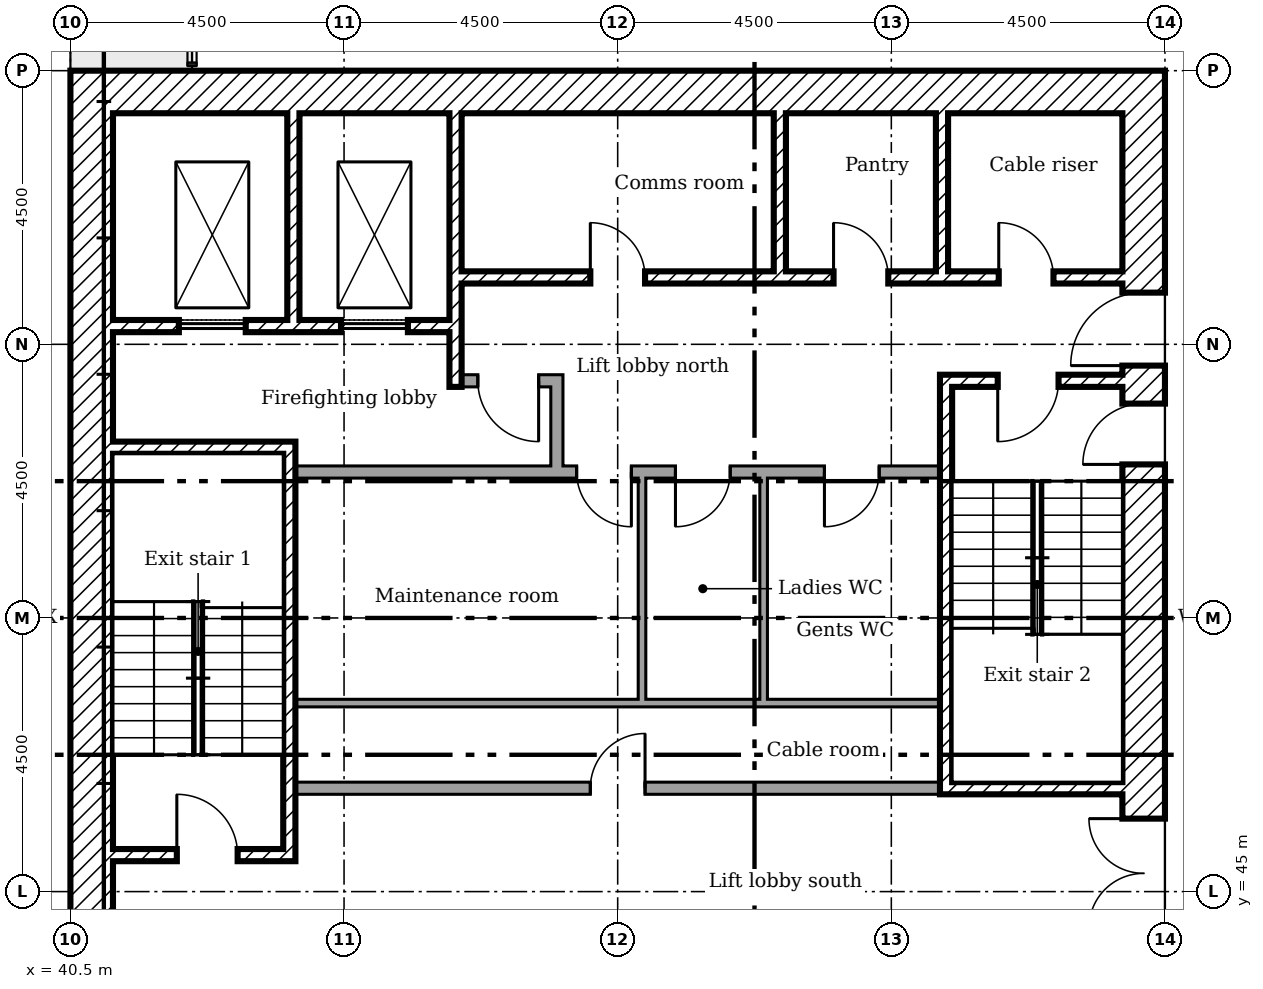
"""IFC4 building model, lengths in metres.
Left out: names, types, materials, properties, quantities, classifications, styles, units other than length and angle.
Written with IfcOpenShell. Run it as: python <this file> out.ifc"""

import sys

from ifc_helpers import new_model, si_unit, direction, frame, frame_2d, origin, place, context, subcontext, project, spatial, rectangle, extrude, element, fill, save


model = new_model("IFC4")
c1 = context("Model", 3, precision=1e-05, world=origin(), true_north=direction((0.0, 1.0)))
c2 = subcontext(c1, "Body", "Model", "MODEL_VIEW")
j1 = project(units=[si_unit("LENGTHUNIT", "METRE"), si_unit("PLANEANGLEUNIT", "RADIAN")], contexts=[c1])
p1 = place(None, origin())
s1 = spatial("IfcSite", under=j1, at=p1, CompositionType="ELEMENT")
p2 = place(p1, origin())
s2 = spatial("IfcBuilding", under=s1, at=p2, CompositionType="ELEMENT")
p3 = place(p2, frame((0.0, 0.0, 106.4)))
s3 = spatial("IfcBuildingStorey", under=s2, at=p3, CompositionType="ELEMENT", Elevation=106.4)
p4 = place(p3, frame((58.15, 40.5, 0.0), z_axis=(0.0, 0.0, 1.0), x_axis=(0.0, 1.0, 0.0)))
e1 = element("IfcWall", 1, at=p4, inside=s3, PredefinedType="SHEAR", context=c2, shape_type="SweptSolid", body=[
    extrude(rectangle(XDim=18.0, YDim=0.7, at=frame_2d((9.0, 0.0))), origin(), (0.0, 0.0, 1.0), 3.35),
])
p5 = place(p4, frame((13.15, 0.0, 0.0)))
e2 = element("IfcOpeningElement", 2, at=p5, cuts=e1, PredefinedType="OPENING", context=c2, shape_type="SweptSolid", body=[
    extrude(rectangle(XDim=1.2, YDim=2.1, at=frame_2d((0.6, 1.05))), frame((0.0, 0.36, 0.0), z_axis=(0.0, -1.0, 0.0), x_axis=(1.0, 0.0, 0.0)), (0.0, 0.0, 1.0), 0.72),
])
p6 = place(p4, frame((3.9, 0.0, 0.0)))
e3 = element("IfcOpeningElement", 3, at=p6, cuts=e1, PredefinedType="OPENING", context=c2, shape_type="SweptSolid", body=[
    extrude(rectangle(XDim=1.8, YDim=2.1, at=frame_2d((0.9, 1.05))), frame((0.0, 0.36, 0.0), z_axis=(0.0, -1.0, 0.0), x_axis=(1.0, 0.0, 0.0)), (0.0, 0.0, 1.0), 0.72),
])
p7 = place(p4, frame((11.525, 0.0, 0.0)))
e4 = element("IfcOpeningElement", 4, at=p7, cuts=e1, PredefinedType="OPENING", context=c2, shape_type="SweptSolid", body=[
    extrude(rectangle(XDim=1.0, YDim=2.1, at=frame_2d((0.5, 1.05))), frame((0.0, 0.36, 0.0), z_axis=(0.0, -1.0, 0.0), x_axis=(1.0, 0.0, 0.0)), (0.0, 0.0, 1.0), 0.72),
])
p8 = place(p3, frame((41.2, 58.15, 0.0)))
e5 = element("IfcWall", 5, at=p8, inside=s3, PredefinedType="SHEAR", context=c2, shape_type="SweptSolid", body=[
    extrude(rectangle(XDim=16.6, YDim=0.7, at=frame_2d((8.3, 0.0))), origin(), (0.0, 0.0, 1.0), 3.35),
])
p9 = place(p3, frame((40.85, 40.5, 0.0), z_axis=(0.0, 0.0, 1.0), x_axis=(0.0, 1.0, 0.0)))
e6 = element("IfcWall", 6, at=p9, inside=s3, PredefinedType="SHEAR", context=c2, shape_type="SweptSolid", body=[
    extrude(rectangle(XDim=18.0, YDim=0.7, at=frame_2d((9.0, 0.0))), origin(), (0.0, 0.0, 1.0), 3.35),
])
p10 = place(p3, frame((44.167, 57.8, 0.0), z_axis=(0.0, 0.0, 1.0), x_axis=(0.0, -1.0, 0.0)))
e7 = element("IfcWall", 7, at=p10, inside=s3, PredefinedType="SHEAR", context=c2, shape_type="SweptSolid", body=[
    extrude(rectangle(XDim=3.4, YDim=0.2, at=frame_2d((1.7, 0.0))), origin(), (0.0, 0.0, 1.0), 3.35),
])
p11 = place(p3, frame((46.833, 57.8, 0.0), z_axis=(0.0, 0.0, 1.0), x_axis=(0.0, -1.0, 0.0)))
e8 = element("IfcWall", 8, at=p11, inside=s3, PredefinedType="SHEAR", context=c2, shape_type="SweptSolid", body=[
    extrude(rectangle(XDim=4.5, YDim=0.2, at=frame_2d((2.25, 0.0))), origin(), (0.0, 0.0, 1.0), 3.35),
])
for number, where, z_axis, x_axis in (
    (9, (52.167, 57.8, 0.0), (0.0, 0.0, 1.0), (0.0, -1.0, 0.0)),
    (10, (54.833, 57.8, 0.0), (0.0, 0.0, 1.0), (0.0, -1.0, 0.0)),
):
    element("IfcWall", number, at=place(p3, frame(where, z_axis=z_axis, x_axis=x_axis)), inside=s3, PredefinedType="SHEAR", context=c2, shape_type="SweptSolid", body=[
        extrude(rectangle(XDim=2.6, YDim=0.2, at=frame_2d((1.3, 0.0))), origin(), (0.0, 0.0, 1.0), 3.35),
    ])
p12 = place(p3, frame((48.5, 51.9, 0.0), z_axis=(0.0, 0.0, 1.0), x_axis=(0.0, 1.0, 0.0)))
e11 = element("IfcWall", 11, at=p12, inside=s3, PredefinedType="PARTITIONING", context=c2, shape_type="SweptSolid", body=[
    extrude(rectangle(XDim=1.6, YDim=0.2, at=frame_2d((0.8, 0.0))), origin(), (0.0, 0.0, 1.0), 3.35),
])
p13 = place(p3, frame((46.933, 53.4, 0.0)))
e12 = element("IfcWall", 12, at=p13, inside=s3, PredefinedType="PARTITIONING", context=c2, shape_type="SweptSolid", body=[
    extrude(rectangle(XDim=1.467, YDim=0.2, at=frame_2d((0.733, 0.0))), origin(), (0.0, 0.0, 1.0), 3.35),
])
p14 = place(p13, frame((0.267, 0.0, 0.0)))
e13 = element("IfcOpeningElement", 13, at=p14, cuts=e12, PredefinedType="OPENING", context=c2, shape_type="SweptSolid", body=[
    extrude(rectangle(XDim=1.0, YDim=2.1, at=frame_2d((0.5, 1.05))), frame((0.0, 0.11, 0.0), z_axis=(0.0, -1.0, 0.0), x_axis=(1.0, 0.0, 0.0)), (0.0, 0.0, 1.0), 0.22),
])
p15 = place(p3, frame((46.933, 55.1, 0.0)))
e14 = element("IfcWall", 14, at=p15, inside=s3, PredefinedType="SHEAR", context=c2, shape_type="SweptSolid", body=[
    extrude(rectangle(XDim=10.867, YDim=0.2, at=frame_2d((5.433, 0.0))), origin(), (0.0, 0.0, 1.0), 3.35),
])
p16 = place(p15, frame((8.833, 0.0, 0.0)))
e15 = element("IfcOpeningElement", 15, at=p16, cuts=e14, PredefinedType="OPENING", context=c2, shape_type="SweptSolid", body=[
    extrude(rectangle(XDim=0.9, YDim=2.1, at=frame_2d((0.45, 1.05))), frame((0.0, 0.11, 0.0), z_axis=(0.0, -1.0, 0.0), x_axis=(1.0, 0.0, 0.0)), (0.0, 0.0, 1.0), 0.22),
])
p17 = place(p15, frame((2.117, 0.0, 0.0)))
e16 = element("IfcOpeningElement", 16, at=p17, cuts=e14, PredefinedType="OPENING", context=c2, shape_type="SweptSolid", body=[
    extrude(rectangle(XDim=0.9, YDim=2.1, at=frame_2d((0.45, 1.05))), frame((0.0, 0.11, 0.0), z_axis=(0.0, -1.0, 0.0), x_axis=(1.0, 0.0, 0.0)), (0.0, 0.0, 1.0), 0.22),
])
p18 = place(p15, frame((6.117, 0.0, 0.0)))
e17 = element("IfcOpeningElement", 17, at=p18, cuts=e14, PredefinedType="OPENING", context=c2, shape_type="SweptSolid", body=[
    extrude(rectangle(XDim=0.9, YDim=2.1, at=frame_2d((0.45, 1.05))), frame((0.0, 0.11, 0.0), z_axis=(0.0, -1.0, 0.0), x_axis=(1.0, 0.0, 0.0)), (0.0, 0.0, 1.0), 0.22),
])
p19 = place(p3, frame((41.2, 54.3, 0.0)))
e18 = element("IfcWall", 18, at=p19, inside=s3, PredefinedType="SHEAR", context=c2, shape_type="SweptSolid", body=[
    extrude(rectangle(XDim=5.533, YDim=0.2, at=frame_2d((2.767, 0.0))), origin(), (0.0, 0.0, 1.0), 3.35),
])
p20 = place(p19, frame((1.083, 0.0, 0.0)))
e19 = element("IfcOpeningElement", 19, at=p20, cuts=e18, PredefinedType="OPENING", context=c2, shape_type="SweptSolid", body=[
    extrude(rectangle(XDim=1.1, YDim=2.1, at=frame_2d((0.55, 1.05))), frame((0.0, 0.11, 0.0), z_axis=(0.0, -1.0, 0.0), x_axis=(1.0, 0.0, 0.0)), (0.0, 0.0, 1.0), 0.22),
])
p21 = place(p19, frame((3.75, 0.0, 0.0)))
e20 = element("IfcOpeningElement", 20, at=p21, cuts=e18, PredefinedType="OPENING", context=c2, shape_type="SweptSolid", body=[
    extrude(rectangle(XDim=1.1, YDim=2.1, at=frame_2d((0.55, 1.05))), frame((0.0, 0.11, 0.0), z_axis=(0.0, -1.0, 0.0), x_axis=(1.0, 0.0, 0.0)), (0.0, 0.0, 1.0), 0.22),
])
p22 = place(p3, frame((44.1, 45.5, 0.0), z_axis=(0.0, 0.0, 1.0), x_axis=(0.0, 1.0, 0.0)))
e21 = element("IfcWall", 21, at=p22, inside=s3, PredefinedType="SHEAR", context=c2, shape_type="SweptSolid", body=[
    extrude(rectangle(XDim=6.9, YDim=0.2, at=frame_2d((3.45, 0.0))), origin(), (0.0, 0.0, 1.0), 3.35),
])
p23 = place(p3, frame((41.2, 52.3, 0.0)))
e22 = element("IfcWall", 22, at=p23, inside=s3, PredefinedType="SHEAR", context=c2, shape_type="SweptSolid", body=[
    extrude(rectangle(XDim=2.8, YDim=0.2, at=frame_2d((1.4, 0.0))), origin(), (0.0, 0.0, 1.0), 3.35),
])
p24 = place(p3, frame((41.2, 45.6, 0.0)))
e23 = element("IfcWall", 23, at=p24, inside=s3, PredefinedType="SHEAR", context=c2, shape_type="SweptSolid", body=[
    extrude(rectangle(XDim=2.8, YDim=0.2, at=frame_2d((1.4, 0.0))), origin(), (0.0, 0.0, 1.0), 3.35),
])
p25 = place(p24, frame((1.05, 0.0, 0.0)))
e24 = element("IfcOpeningElement", 24, at=p25, cuts=e23, PredefinedType="OPENING", context=c2, shape_type="SweptSolid", body=[
    extrude(rectangle(XDim=1.0, YDim=2.1, at=frame_2d((0.5, 1.05))), frame((0.0, 0.11, 0.0), z_axis=(0.0, -1.0, 0.0), x_axis=(1.0, 0.0, 0.0)), (0.0, 0.0, 1.0), 0.22),
])
p26 = place(p3, frame((54.8, 53.4, 0.0)))
e25 = element("IfcWall", 25, at=p26, inside=s3, PredefinedType="SHEAR", context=c2, shape_type="SweptSolid", body=[
    extrude(rectangle(XDim=3.0, YDim=0.2, at=frame_2d((1.5, 0.0))), origin(), (0.0, 0.0, 1.0), 3.35),
])
p27 = place(p26, frame((0.95, 0.0, 0.0)))
e26 = element("IfcOpeningElement", 26, at=p27, cuts=e25, PredefinedType="OPENING", context=c2, shape_type="SweptSolid", body=[
    extrude(rectangle(XDim=1.0, YDim=2.1, at=frame_2d((0.5, 1.05))), frame((0.0, 0.11, 0.0), z_axis=(0.0, -1.0, 0.0), x_axis=(1.0, 0.0, 0.0)), (0.0, 0.0, 1.0), 0.22),
])
p28 = place(p3, frame((54.8, 46.7, 0.0)))
e27 = element("IfcWall", 27, at=p28, inside=s3, PredefinedType="SHEAR", context=c2, shape_type="SweptSolid", body=[
    extrude(rectangle(XDim=3.0, YDim=0.2, at=frame_2d((1.5, 0.0))), origin(), (0.0, 0.0, 1.0), 3.35),
])
p29 = place(p3, frame((54.9, 46.8, 0.0), z_axis=(0.0, 0.0, 1.0), x_axis=(0.0, 1.0, 0.0)))
e28 = element("IfcWall", 28, at=p29, inside=s3, PredefinedType="SHEAR", context=c2, shape_type="SweptSolid", body=[
    extrude(rectangle(XDim=6.5, YDim=0.2, at=frame_2d((3.25, 0.0))), origin(), (0.0, 0.0, 1.0), 3.35),
])
p30 = place(p3, frame((44.2, 51.9, 0.0)))
e29 = element("IfcWall", 29, at=p30, inside=s3, PredefinedType="PARTITIONING", context=c2, shape_type="SweptSolid", body=[
    extrude(rectangle(XDim=10.6, YDim=0.2, at=frame_2d((5.3, 0.0))), origin(), (0.0, 0.0, 1.0), 3.35),
])
p31 = place(p30, frame((4.625, 0.0, 0.0)))
e30 = element("IfcOpeningElement", 30, at=p31, cuts=e29, PredefinedType="OPENING", context=c2, shape_type="SweptSolid", body=[
    extrude(rectangle(XDim=0.9, YDim=2.1, at=frame_2d((0.45, 1.05))), frame((0.0, 0.11, 0.0), z_axis=(0.0, -1.0, 0.0), x_axis=(1.0, 0.0, 0.0)), (0.0, 0.0, 1.0), 0.22),
])
p32 = place(p30, frame((6.25, 0.0, 0.0)))
e31 = element("IfcOpeningElement", 31, at=p32, cuts=e29, PredefinedType="OPENING", context=c2, shape_type="SweptSolid", body=[
    extrude(rectangle(XDim=0.9, YDim=2.1, at=frame_2d((0.45, 1.05))), frame((0.0, 0.11, 0.0), z_axis=(0.0, -1.0, 0.0), x_axis=(1.0, 0.0, 0.0)), (0.0, 0.0, 1.0), 0.22),
])
p33 = place(p30, frame((8.7, 0.0, 0.0)))
e32 = element("IfcOpeningElement", 32, at=p33, cuts=e29, PredefinedType="OPENING", context=c2, shape_type="SweptSolid", body=[
    extrude(rectangle(XDim=0.9, YDim=2.1, at=frame_2d((0.45, 1.05))), frame((0.0, 0.11, 0.0), z_axis=(0.0, -1.0, 0.0), x_axis=(1.0, 0.0, 0.0)), (0.0, 0.0, 1.0), 0.22),
])
p34 = place(p3, frame((44.2, 46.7, 0.0)))
e33 = element("IfcWall", 33, at=p34, inside=s3, PredefinedType="PARTITIONING", context=c2, shape_type="SweptSolid", body=[
    extrude(rectangle(XDim=10.6, YDim=0.2, at=frame_2d((5.3, 0.0))), origin(), (0.0, 0.0, 1.0), 3.35),
])
p35 = place(p34, frame((4.85, 0.0, 0.0)))
e34 = element("IfcOpeningElement", 34, at=p35, cuts=e33, PredefinedType="OPENING", context=c2, shape_type="SweptSolid", body=[
    extrude(rectangle(XDim=0.9, YDim=2.1, at=frame_2d((0.45, 1.05))), frame((0.0, 0.11, 0.0), z_axis=(0.0, -1.0, 0.0), x_axis=(1.0, 0.0, 0.0)), (0.0, 0.0, 1.0), 0.22),
])
p36 = place(p3, frame((49.962, 48.1, 0.0), z_axis=(0.0, 0.0, 1.0), x_axis=(-1.0, 0.0, 0.0)))
e35 = element("IfcWall", 35, at=p36, inside=s3, PredefinedType="PARTITIONING", context=c2, shape_type="SweptSolid", body=[
    extrude(rectangle(XDim=5.762, YDim=0.125, at=frame_2d((2.881, 0.0))), origin(), (0.0, 0.0, 1.0), 3.35),
])
p37 = place(p3, frame((51.962, 48.1, 0.0), z_axis=(0.0, 0.0, 1.0), x_axis=(-1.0, 0.0, 0.0)))
e36 = element("IfcWall", 36, at=p37, inside=s3, PredefinedType="PARTITIONING", context=c2, shape_type="SweptSolid", body=[
    extrude(rectangle(XDim=2.062, YDim=0.125, at=frame_2d((1.031, 0.0))), origin(), (0.0, 0.0, 1.0), 3.35),
])
p38 = place(p3, frame((49.9, 48.163, 0.0), z_axis=(0.0, 0.0, 1.0), x_axis=(0.0, 1.0, 0.0)))
e37 = element("IfcWall", 37, at=p38, inside=s3, PredefinedType="PARTITIONING", context=c2, shape_type="SweptSolid", body=[
    extrude(rectangle(XDim=3.637, YDim=0.125, at=frame_2d((1.819, 0.0))), origin(), (0.0, 0.0, 1.0), 3.35),
])
p39 = place(p3, frame((54.8, 48.1, 0.0), z_axis=(0.0, 0.0, 1.0), x_axis=(-1.0, 0.0, 0.0)))
e38 = element("IfcWall", 38, at=p39, inside=s3, PredefinedType="PARTITIONING", context=c2, shape_type="SweptSolid", body=[
    extrude(rectangle(XDim=2.9, YDim=0.125, at=frame_2d((1.45, 0.0))), origin(), (0.0, 0.0, 1.0), 3.35),
])
p40 = place(p3, frame((51.9, 48.163, 0.0), z_axis=(0.0, 0.0, 1.0), x_axis=(0.0, 1.0, 0.0)))
e39 = element("IfcWall", 39, at=p40, inside=s3, PredefinedType="PARTITIONING", context=c2, shape_type="SweptSolid", body=[
    extrude(rectangle(XDim=3.637, YDim=0.125, at=frame_2d((1.819, 0.0))), origin(), (0.0, 0.0, 1.0), 3.35),
])
p41 = place(p5, origin())
e40 = element("IfcDoor", 40, at=p41, inside=s3, OperationType="SINGLE_SWING_RIGHT", PredefinedType="DOOR", context=c2, shape_type="SweptSolid", body=[
    extrude(rectangle(XDim=1.2, YDim=2.1, at=frame_2d((0.6, 1.05))), frame((0.0, 0.025, 0.0), z_axis=(0.0, -1.0, 0.0), x_axis=(1.0, 0.0, 0.0)), (0.0, 0.0, 1.0), 0.05),
])
fill(e2, e40)
p42 = place(p6, origin())
e41 = element("IfcDoor", 41, at=p42, inside=s3, OperationType="DOUBLE_DOOR_SINGLE_SWING", PredefinedType="DOOR", context=c2, shape_type="SweptSolid", body=[
    extrude(rectangle(XDim=1.8, YDim=2.1, at=frame_2d((0.9, 1.05))), frame((0.0, 0.025, 0.0), z_axis=(0.0, -1.0, 0.0), x_axis=(1.0, 0.0, 0.0)), (0.0, 0.0, 1.0), 0.05),
])
fill(e3, e41)
p43 = place(p25, origin())
e42 = element("IfcDoor", 42, at=p43, inside=s3, OperationType="SINGLE_SWING_RIGHT", PredefinedType="DOOR", context=c2, shape_type="SweptSolid", body=[
    extrude(rectangle(XDim=1.0, YDim=2.1, at=frame_2d((0.5, 1.05))), frame((0.0, 0.025, 0.0), z_axis=(0.0, -1.0, 0.0), x_axis=(1.0, 0.0, 0.0)), (0.0, 0.0, 1.0), 0.05),
])
fill(e24, e42)
p44 = place(p27, frame((1.0, 0.0, 0.0), x_axis=(-1.0, 0.0, 0.0)))
e43 = element("IfcDoor", 43, at=p44, inside=s3, OperationType="SINGLE_SWING_LEFT", PredefinedType="DOOR", context=c2, shape_type="SweptSolid", body=[
    extrude(rectangle(XDim=1.0, YDim=2.1, at=frame_2d((0.5, 1.05))), frame((0.0, 0.025, 0.0), z_axis=(0.0, -1.0, 0.0), x_axis=(1.0, 0.0, 0.0)), (0.0, 0.0, 1.0), 0.05),
])
fill(e26, e43)
p45 = place(p7, origin())
e44 = element("IfcDoor", 44, at=p45, inside=s3, OperationType="SINGLE_SWING_RIGHT", PredefinedType="DOOR", context=c2, shape_type="SweptSolid", body=[
    extrude(rectangle(XDim=1.0, YDim=2.1, at=frame_2d((0.5, 1.05))), frame((0.0, 0.025, 0.0), z_axis=(0.0, -1.0, 0.0), x_axis=(1.0, 0.0, 0.0)), (0.0, 0.0, 1.0), 0.05),
])
fill(e4, e44)
p46 = place(p14, frame((1.0, 0.0, 0.0), x_axis=(-1.0, 0.0, 0.0)))
e45 = element("IfcDoor", 45, at=p46, inside=s3, OperationType="SINGLE_SWING_RIGHT", PredefinedType="DOOR", context=c2, shape_type="SweptSolid", body=[
    extrude(rectangle(XDim=1.0, YDim=2.1, at=frame_2d((0.5, 1.05))), frame((0.0, 0.025, 0.0), z_axis=(0.0, -1.0, 0.0), x_axis=(1.0, 0.0, 0.0)), (0.0, 0.0, 1.0), 0.05),
])
fill(e13, e45)
p47 = place(p16, origin())
e46 = element("IfcDoor", 46, at=p47, inside=s3, OperationType="SINGLE_SWING_RIGHT", PredefinedType="DOOR", context=c2, shape_type="SweptSolid", body=[
    extrude(rectangle(XDim=0.9, YDim=2.1, at=frame_2d((0.45, 1.05))), frame((0.0, 0.025, 0.0), z_axis=(0.0, -1.0, 0.0), x_axis=(1.0, 0.0, 0.0)), (0.0, 0.0, 1.0), 0.05),
])
fill(e15, e46)
p48 = place(p17, origin())
e47 = element("IfcDoor", 47, at=p48, inside=s3, OperationType="SINGLE_SWING_RIGHT", PredefinedType="DOOR", context=c2, shape_type="SweptSolid", body=[
    extrude(rectangle(XDim=0.9, YDim=2.1, at=frame_2d((0.45, 1.05))), frame((0.0, 0.025, 0.0), z_axis=(0.0, -1.0, 0.0), x_axis=(1.0, 0.0, 0.0)), (0.0, 0.0, 1.0), 0.05),
])
fill(e16, e47)
p49 = place(p18, origin())
e48 = element("IfcDoor", 48, at=p49, inside=s3, OperationType="SINGLE_SWING_RIGHT", PredefinedType="DOOR", context=c2, shape_type="SweptSolid", body=[
    extrude(rectangle(XDim=0.9, YDim=2.1, at=frame_2d((0.45, 1.05))), frame((0.0, 0.025, 0.0), z_axis=(0.0, -1.0, 0.0), x_axis=(1.0, 0.0, 0.0)), (0.0, 0.0, 1.0), 0.05),
])
fill(e17, e48)
p50 = place(p35, origin())
e49 = element("IfcDoor", 49, at=p50, inside=s3, OperationType="SINGLE_SWING_LEFT", PredefinedType="DOOR", context=c2, shape_type="SweptSolid", body=[
    extrude(rectangle(XDim=0.9, YDim=2.1, at=frame_2d((0.45, 1.05))), frame((0.0, 0.025, 0.0), z_axis=(0.0, -1.0, 0.0), x_axis=(1.0, 0.0, 0.0)), (0.0, 0.0, 1.0), 0.05),
])
fill(e34, e49)
p51 = place(p31, frame((0.9, 0.0, 0.0), x_axis=(-1.0, 0.0, 0.0)))
e50 = element("IfcDoor", 50, at=p51, inside=s3, OperationType="SINGLE_SWING_RIGHT", PredefinedType="DOOR", context=c2, shape_type="SweptSolid", body=[
    extrude(rectangle(XDim=0.9, YDim=2.1, at=frame_2d((0.45, 1.05))), frame((0.0, 0.025, 0.0), z_axis=(0.0, -1.0, 0.0), x_axis=(1.0, 0.0, 0.0)), (0.0, 0.0, 1.0), 0.05),
])
fill(e30, e50)
p52 = place(p32, frame((0.9, 0.0, 0.0), x_axis=(-1.0, 0.0, 0.0)))
e51 = element("IfcDoor", 51, at=p52, inside=s3, OperationType="SINGLE_SWING_LEFT", PredefinedType="DOOR", context=c2, shape_type="SweptSolid", body=[
    extrude(rectangle(XDim=0.9, YDim=2.1, at=frame_2d((0.45, 1.05))), frame((0.0, 0.025, 0.0), z_axis=(0.0, -1.0, 0.0), x_axis=(1.0, 0.0, 0.0)), (0.0, 0.0, 1.0), 0.05),
])
fill(e31, e51)
p53 = place(p33, frame((0.9, 0.0, 0.0), x_axis=(-1.0, 0.0, 0.0)))
e52 = element("IfcDoor", 52, at=p53, inside=s3, OperationType="SINGLE_SWING_LEFT", PredefinedType="DOOR", context=c2, shape_type="SweptSolid", body=[
    extrude(rectangle(XDim=0.9, YDim=2.1, at=frame_2d((0.45, 1.05))), frame((0.0, 0.025, 0.0), z_axis=(0.0, -1.0, 0.0), x_axis=(1.0, 0.0, 0.0)), (0.0, 0.0, 1.0), 0.05),
])
fill(e32, e52)
p54 = place(p20, origin())
e53 = element("IfcDoor", 53, at=p54, inside=s3, OperationType="SLIDING_TO_LEFT", PredefinedType="DOOR", context=c2, shape_type="SweptSolid", body=[
    extrude(rectangle(XDim=1.1, YDim=2.1, at=frame_2d((0.55, 1.05))), frame((0.0, 0.025, 0.0), z_axis=(0.0, -1.0, 0.0), x_axis=(1.0, 0.0, 0.0)), (0.0, 0.0, 1.0), 0.05),
])
fill(e19, e53)
p55 = place(p21, origin())
e54 = element("IfcDoor", 54, at=p55, inside=s3, OperationType="SLIDING_TO_LEFT", PredefinedType="DOOR", context=c2, shape_type="SweptSolid", body=[
    extrude(rectangle(XDim=1.1, YDim=2.1, at=frame_2d((0.55, 1.05))), frame((0.0, 0.025, 0.0), z_axis=(0.0, -1.0, 0.0), x_axis=(1.0, 0.0, 0.0)), (0.0, 0.0, 1.0), 0.05),
])
fill(e20, e54)
save(model, sys.argv[1])
